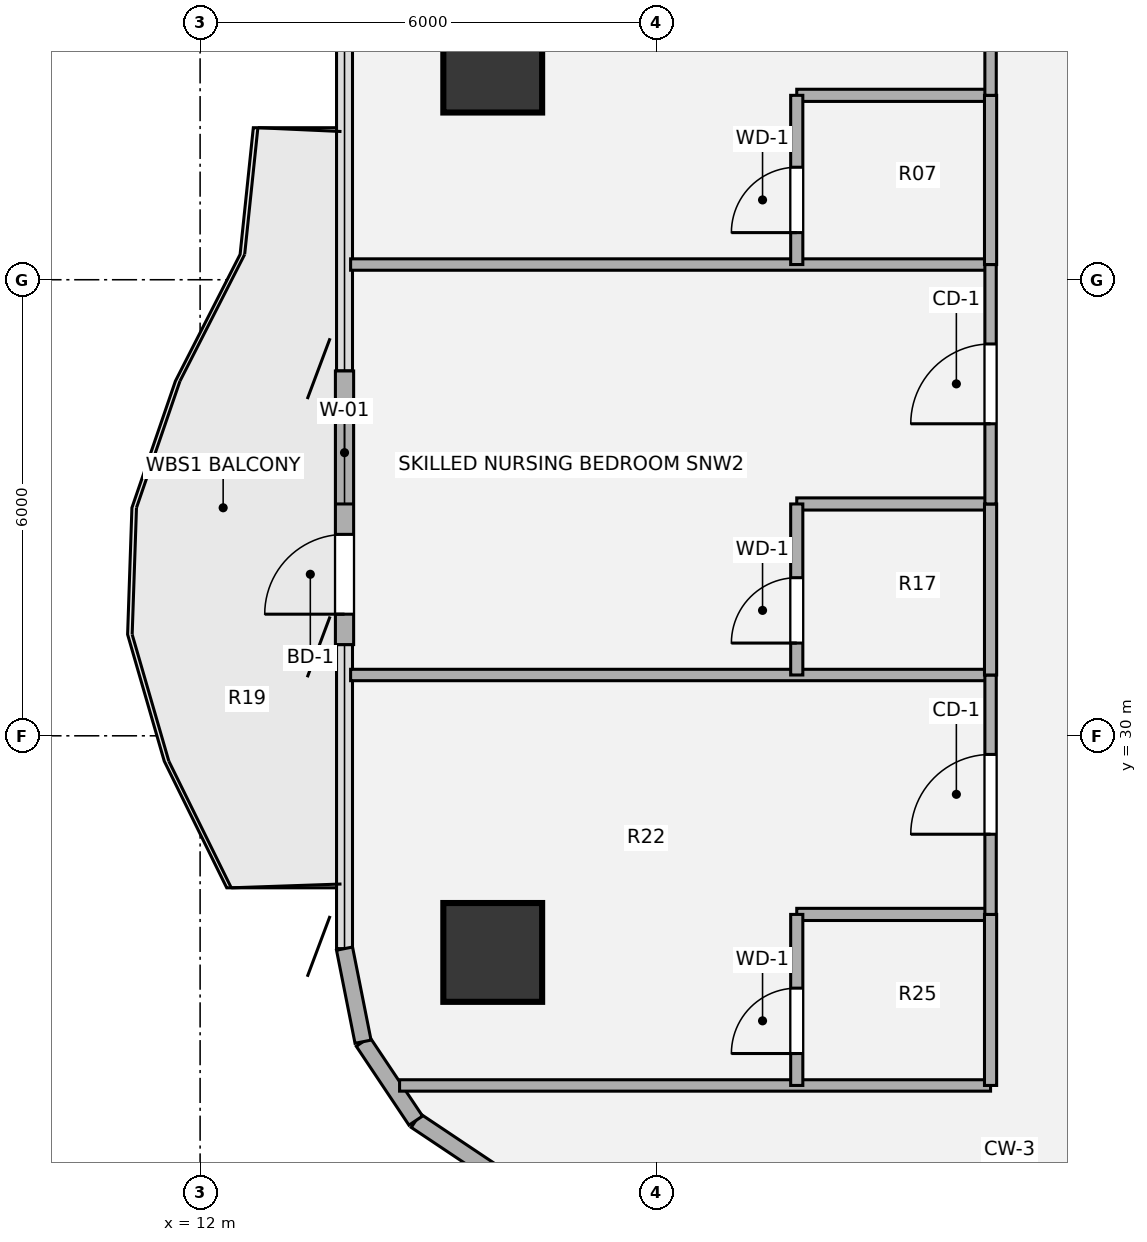
"""IFC4 building model, lengths in metres.
Left out: names, types, materials, properties, quantities, classifications, styles, units other than length and angle.
Written with IfcOpenShell. Run it as: python <this file> out.ifc"""

import sys

from ifc_helpers import new_model, si_unit, direction, frame, frame_2d, origin, origin_2d, place, context, subcontext, project, spatial, rectangle, hollow_circle, extrude, source, transform, mapped, element, fill, save


model = new_model("IFC4")
c1 = context("Model", 3, precision=1e-05, world=origin(), true_north=direction((0.0, 1.0)))
c2 = subcontext(c1, "Body", "Model", "MODEL_VIEW")
j1 = project(units=[si_unit("LENGTHUNIT", "METRE"), si_unit("PLANEANGLEUNIT", "RADIAN")], contexts=[c1])
p1 = place(None, origin())
s1 = spatial("IfcSite", under=j1, at=p1, CompositionType="ELEMENT")
p2 = place(p1, origin())
s2 = spatial("IfcBuilding", under=s1, at=p2, CompositionType="ELEMENT")
p3 = place(p2, frame((0.0, 0.0, 131.4)))
s3 = spatial("IfcBuildingStorey", under=s2, at=p3, CompositionType="ELEMENT", Elevation=131.4)
m1 = source(origin(), c2, "Body", "SweptSolid", [
    extrude(hollow_circle(Radius=0.65, WallThickness=0.045, at=origin_2d()), origin(), (0.0, 0.0, 1.0), 3.78),
])
for number, where, z_axis, x_axis in (
    (1, (15.85, 27.15, 0.0), (0.0, 0.0, 1.0), (1.0, 0.0, 0.0)),
    (2, (15.85, 38.85, 0.0), (0.0, 0.0, 1.0), (1.0, 0.0, 0.0)),
):
    element("IfcColumn", number, at=place(p3, frame(where, z_axis=z_axis, x_axis=x_axis)), inside=s3, PredefinedType="COLUMN", context=c2, shape_type="MappedRepresentation", body=[
        mapped(m1, transform((0.0, 0.0, 0.0), x_axis=(1.0, 0.0, 0.0), y_axis=(0.0, 1.0, 0.0), z_axis=(0.0, 0.0, 1.0), scale=1.0)),
    ])
for number, where, z_axis, x_axis in (
    (3, (15.875, 24.244, 0.0), (0.0, 0.0, 1.0), (-0.831, 0.556, 0.0)),
    (4, (14.837, 24.937, 0.0), (0.0, 0.0, 1.0), (-0.556, 0.831, 0.0)),
    (5, (14.144, 25.975, 0.0), (0.0, 0.0, 1.0), (-0.195, 0.981, 0.0)),
):
    element("IfcWall", number, at=place(p3, frame(where, z_axis=z_axis, x_axis=x_axis)), inside=s3, PredefinedType="SOLIDWALL", context=c2, shape_type="SweptSolid", body=[
        extrude(rectangle(XDim=1.249, YDim=0.215, at=frame_2d((0.624, 0.0))), origin(), (0.0, 0.0, 1.0), 3.53),
    ])
p4 = place(p3, frame((13.9, 31.2, 0.0), z_axis=(0.0, 0.0, 1.0), x_axis=(0.0, 1.0, 0.0)))
e6 = element("IfcWall", 6, at=p4, inside=s3, PredefinedType="SOLIDWALL", context=c2, shape_type="SweptSolid", body=[
    extrude(rectangle(XDim=3.6, YDim=0.24, at=frame_2d((1.8, 0.0))), origin(), (0.0, 0.0, 1.0), 3.53),
])
p5 = place(p4, frame((0.4, 0.0, 0.0)))
e7 = element("IfcOpeningElement", 7, at=p5, cuts=e6, PredefinedType="OPENING", context=c2, shape_type="SweptSolid", body=[
    extrude(rectangle(XDim=1.05, YDim=2.15, at=origin_2d()), frame((0.525, 0.13, 1.075), z_axis=(0.0, -1.0, 0.0), x_axis=(1.0, 0.0, 0.0)), (0.0, 0.0, 1.0), 0.26),
])
p6 = place(p4, frame((1.85, 0.0, 0.85)))
e8 = element("IfcOpeningElement", 8, at=p6, cuts=e6, PredefinedType="OPENING", context=c2, shape_type="SweptSolid", body=[
    extrude(rectangle(XDim=1.35, YDim=1.35, at=origin_2d()), frame((0.675, 0.13, 0.675), z_axis=(0.0, -1.0, 0.0), x_axis=(1.0, 0.0, 0.0)), (0.0, 0.0, 1.0), 0.26),
])
p7 = place(p3, frame((14.624, 25.4, 0.0), z_axis=(0.0, 0.0, 1.0), x_axis=(1.0, 0.0, 0.0)))
e9 = element("IfcWall", 9, at=p7, inside=s3, PredefinedType="PARTITIONING", context=c2, shape_type="SweptSolid", body=[
    extrude(rectangle(XDim=7.776, YDim=0.15, at=frame_2d((3.888, 0.0))), origin(), (0.0, 0.0, 1.0), 3.5),
])
p8 = place(p3, frame((19.85, 27.65, 0.0), z_axis=(0.0, 0.0, 1.0), x_axis=(1.0, 0.0, 0.0)))
e10 = element("IfcWall", 10, at=p8, inside=s3, PredefinedType="PLUMBINGWALL", context=c2, shape_type="SweptSolid", body=[
    extrude(rectangle(XDim=2.55, YDim=0.16, at=frame_2d((1.275, 0.0))), origin(), (0.0, 0.0, 1.0), 2.982),
])
p9 = place(p3, frame((13.98, 30.8, 0.0), z_axis=(0.0, 0.0, 1.0), x_axis=(1.0, 0.0, 0.0)))
e11 = element("IfcWall", 11, at=p9, inside=s3, PredefinedType="PARTITIONING", context=c2, shape_type="SweptSolid", body=[
    extrude(rectangle(XDim=8.42, YDim=0.15, at=frame_2d((4.21, 0.0))), origin(), (0.0, 0.0, 1.0), 2.982),
])
p10 = place(p3, frame((19.85, 33.05, 0.0), z_axis=(0.0, 0.0, 1.0), x_axis=(1.0, 0.0, 0.0)))
e12 = element("IfcWall", 12, at=p10, inside=s3, PredefinedType="PLUMBINGWALL", context=c2, shape_type="SweptSolid", body=[
    extrude(rectangle(XDim=2.55, YDim=0.16, at=frame_2d((1.275, 0.0))), origin(), (0.0, 0.0, 1.0), 2.982),
])
p11 = place(p3, frame((13.98, 36.2, 0.0), z_axis=(0.0, 0.0, 1.0), x_axis=(1.0, 0.0, 0.0)))
e13 = element("IfcWall", 13, at=p11, inside=s3, PredefinedType="PARTITIONING", context=c2, shape_type="SweptSolid", body=[
    extrude(rectangle(XDim=8.42, YDim=0.15, at=frame_2d((4.21, 0.0))), origin(), (0.0, 0.0, 1.0), 2.982),
])
p12 = place(p3, frame((19.85, 38.426, 0.0), z_axis=(0.0, 0.0, 1.0), x_axis=(1.0, 0.0, 0.0)))
e14 = element("IfcWall", 14, at=p12, inside=s3, PredefinedType="PLUMBINGWALL", context=c2, shape_type="SweptSolid", body=[
    extrude(rectangle(XDim=2.55, YDim=0.16, at=frame_2d((1.275, 0.0))), origin(), (0.0, 0.0, 1.0), 3.055),
])
p13 = place(p3, frame((19.85, 25.4, 0.0), z_axis=(0.0, 0.0, 1.0), x_axis=(0.0, 1.0, 0.0)))
e15 = element("IfcWall", 15, at=p13, inside=s3, PredefinedType="PLUMBINGWALL", context=c2, shape_type="SweptSolid", body=[
    extrude(rectangle(XDim=2.25, YDim=0.16, at=frame_2d((1.125, 0.0))), origin(), (0.0, 0.0, 1.0), 3.5),
])
p14 = place(p13, frame((0.42, 0.0, 0.0)))
e16 = element("IfcOpeningElement", 16, at=p14, cuts=e15, PredefinedType="OPENING", context=c2, shape_type="SweptSolid", body=[
    extrude(rectangle(XDim=0.86, YDim=2.1, at=origin_2d()), frame((0.43, 0.09, 1.05), z_axis=(0.0, -1.0, 0.0), x_axis=(1.0, 0.0, 0.0)), (0.0, 0.0, 1.0), 0.18),
])
p15 = place(p3, frame((19.85, 30.8, 0.0), z_axis=(0.0, 0.0, 1.0), x_axis=(0.0, 1.0, 0.0)))
e17 = element("IfcWall", 17, at=p15, inside=s3, PredefinedType="PLUMBINGWALL", context=c2, shape_type="SweptSolid", body=[
    extrude(rectangle(XDim=2.25, YDim=0.16, at=frame_2d((1.125, 0.0))), origin(), (0.0, 0.0, 1.0), 3.5),
])
p16 = place(p15, frame((0.42, 0.0, 0.0)))
e18 = element("IfcOpeningElement", 18, at=p16, cuts=e17, PredefinedType="OPENING", context=c2, shape_type="SweptSolid", body=[
    extrude(rectangle(XDim=0.86, YDim=2.1, at=origin_2d()), frame((0.43, 0.09, 1.05), z_axis=(0.0, -1.0, 0.0), x_axis=(1.0, 0.0, 0.0)), (0.0, 0.0, 1.0), 0.18),
])
p17 = place(p3, frame((19.85, 36.2, 0.0), z_axis=(0.0, 0.0, 1.0), x_axis=(0.0, 1.0, 0.0)))
e19 = element("IfcWall", 19, at=p17, inside=s3, PredefinedType="PLUMBINGWALL", context=c2, shape_type="SweptSolid", body=[
    extrude(rectangle(XDim=2.226, YDim=0.16, at=frame_2d((1.113, 0.0))), origin(), (0.0, 0.0, 1.0), 3.5),
])
p18 = place(p17, frame((0.42, 0.0, 0.0)))
e20 = element("IfcOpeningElement", 20, at=p18, cuts=e19, PredefinedType="OPENING", context=c2, shape_type="SweptSolid", body=[
    extrude(rectangle(XDim=0.86, YDim=2.1, at=origin_2d()), frame((0.43, 0.09, 1.05), z_axis=(0.0, -1.0, 0.0), x_axis=(1.0, 0.0, 0.0)), (0.0, 0.0, 1.0), 0.18),
])
p19 = place(p3, frame((22.4, 25.4, 0.0), z_axis=(0.0, 0.0, 1.0), x_axis=(0.0, 1.0, 0.0)))
e21 = element("IfcWall", 21, at=p19, inside=s3, PredefinedType="PLUMBINGWALL", context=c2, shape_type="SweptSolid", body=[
    extrude(rectangle(XDim=2.25, YDim=0.16, at=frame_2d((1.125, 0.0))), origin(), (0.0, 0.0, 1.0), 3.5),
])
p20 = place(p3, frame((22.4, 27.65, 0.0), z_axis=(0.0, 0.0, 1.0), x_axis=(0.0, 1.0, 0.0)))
e22 = element("IfcWall", 22, at=p20, inside=s3, PredefinedType="PARTITIONING", context=c2, shape_type="SweptSolid", body=[
    extrude(rectangle(XDim=3.15, YDim=0.15, at=frame_2d((1.575, 0.0))), origin(), (0.0, 0.0, 1.0), 3.5),
])
p21 = place(p20, frame((1.055, 0.0, 0.0)))
e23 = element("IfcOpeningElement", 23, at=p21, cuts=e22, PredefinedType="OPENING", context=c2, shape_type="SweptSolid", body=[
    extrude(rectangle(XDim=1.05, YDim=2.1, at=origin_2d()), frame((0.525, 0.085, 1.05), z_axis=(0.0, -1.0, 0.0), x_axis=(1.0, 0.0, 0.0)), (0.0, 0.0, 1.0), 0.17),
])
p22 = place(p3, frame((22.4, 30.8, 0.0), z_axis=(0.0, 0.0, 1.0), x_axis=(0.0, 1.0, 0.0)))
e24 = element("IfcWall", 24, at=p22, inside=s3, PredefinedType="PLUMBINGWALL", context=c2, shape_type="SweptSolid", body=[
    extrude(rectangle(XDim=2.25, YDim=0.16, at=frame_2d((1.125, 0.0))), origin(), (0.0, 0.0, 1.0), 3.5),
])
p23 = place(p3, frame((22.4, 33.05, 0.0), z_axis=(0.0, 0.0, 1.0), x_axis=(0.0, 1.0, 0.0)))
e25 = element("IfcWall", 25, at=p23, inside=s3, PredefinedType="PARTITIONING", context=c2, shape_type="SweptSolid", body=[
    extrude(rectangle(XDim=3.15, YDim=0.15, at=frame_2d((1.575, 0.0))), origin(), (0.0, 0.0, 1.0), 3.5),
])
p24 = place(p23, frame((1.055, 0.0, 0.0)))
e26 = element("IfcOpeningElement", 26, at=p24, cuts=e25, PredefinedType="OPENING", context=c2, shape_type="SweptSolid", body=[
    extrude(rectangle(XDim=1.05, YDim=2.1, at=origin_2d()), frame((0.525, 0.085, 1.05), z_axis=(0.0, -1.0, 0.0), x_axis=(1.0, 0.0, 0.0)), (0.0, 0.0, 1.0), 0.17),
])
p25 = place(p3, frame((22.4, 36.2, 0.0), z_axis=(0.0, 0.0, 1.0), x_axis=(0.0, 1.0, 0.0)))
e27 = element("IfcWall", 27, at=p25, inside=s3, PredefinedType="PLUMBINGWALL", context=c2, shape_type="SweptSolid", body=[
    extrude(rectangle(XDim=2.226, YDim=0.16, at=frame_2d((1.113, 0.0))), origin(), (0.0, 0.0, 1.0), 3.5),
])
p26 = place(p3, frame((22.4, 38.426, 0.0), z_axis=(0.0, 0.0, 1.0), x_axis=(0.0, 1.0, 0.0)))
e28 = element("IfcWall", 28, at=p26, inside=s3, PredefinedType="PARTITIONING", context=c2, shape_type="SweptSolid", body=[
    extrude(rectangle(XDim=3.074, YDim=0.15, at=frame_2d((1.537, 0.0))), origin(), (0.0, 0.0, 1.0), 3.5),
])
p27 = place(p26, frame((1.017, 0.0, 0.0)))
e29 = element("IfcOpeningElement", 29, at=p27, cuts=e28, PredefinedType="OPENING", context=c2, shape_type="SweptSolid", body=[
    extrude(rectangle(XDim=1.05, YDim=2.1, at=origin_2d()), frame((0.525, 0.085, 1.05), z_axis=(0.0, -1.0, 0.0), x_axis=(1.0, 0.0, 0.0)), (0.0, 0.0, 1.0), 0.17),
])
m2 = source(origin(), c2, "Body", "SweptSolid", [
    extrude(rectangle(XDim=1.05, YDim=2.15, at=origin_2d()), frame((0.525, 0.025, 1.075), z_axis=(0.0, -1.0, 0.0), x_axis=(1.0, 0.0, 0.0)), (0.0, 0.0, 1.0), 0.05),
])
p28 = place(p5, origin())
e30 = element("IfcDoor", 30, at=p28, inside=s3, OperationType="SINGLE_SWING_LEFT", PredefinedType="DOOR", context=c2, shape_type="MappedRepresentation", body=[
    mapped(m2, transform((0.0, 0.0, 0.0), x_axis=(1.0, 0.0, 0.0), y_axis=(0.0, 1.0, 0.0), z_axis=(0.0, 0.0, 1.0), scale=1.0)),
])
fill(e7, e30)
m3 = source(origin(), c2, "Body", "SweptSolid", [
    extrude(rectangle(XDim=1.35, YDim=1.35, at=origin_2d()), frame((0.675, 0.03, 0.675), z_axis=(0.0, -1.0, 0.0), x_axis=(1.0, 0.0, 0.0)), (0.0, 0.0, 1.0), 0.06),
])
p29 = place(p6, origin())
e31 = element("IfcWindow", 31, at=p29, inside=s3, PartitioningType="SINGLE_PANEL", PredefinedType="WINDOW", context=c2, shape_type="MappedRepresentation", body=[
    mapped(m3, transform((0.0, 0.0, 0.0), x_axis=(1.0, 0.0, 0.0), y_axis=(0.0, 1.0, 0.0), z_axis=(0.0, 0.0, 1.0), scale=1.0)),
])
fill(e8, e31)
m4 = source(origin(), c2, "Body", "SweptSolid", [
    extrude(rectangle(XDim=0.86, YDim=2.1, at=origin_2d()), frame((0.43, 0.025, 1.05), z_axis=(0.0, -1.0, 0.0), x_axis=(1.0, 0.0, 0.0)), (0.0, 0.0, 1.0), 0.05),
])
p30 = place(p14, origin())
e32 = element("IfcDoor", 32, at=p30, inside=s3, OperationType="SINGLE_SWING_LEFT", PredefinedType="DOOR", context=c2, shape_type="MappedRepresentation", body=[
    mapped(m4, transform((0.0, 0.0, 0.0), x_axis=(1.0, 0.0, 0.0), y_axis=(0.0, 1.0, 0.0), z_axis=(0.0, 0.0, 1.0), scale=1.0)),
])
fill(e16, e32)
p31 = place(p16, origin())
e33 = element("IfcDoor", 33, at=p31, inside=s3, OperationType="SINGLE_SWING_LEFT", PredefinedType="DOOR", context=c2, shape_type="MappedRepresentation", body=[
    mapped(m4, transform((0.0, 0.0, 0.0), x_axis=(1.0, 0.0, 0.0), y_axis=(0.0, 1.0, 0.0), z_axis=(0.0, 0.0, 1.0), scale=1.0)),
])
fill(e18, e33)
p32 = place(p18, origin())
e34 = element("IfcDoor", 34, at=p32, inside=s3, OperationType="SINGLE_SWING_LEFT", PredefinedType="DOOR", context=c2, shape_type="MappedRepresentation", body=[
    mapped(m4, transform((0.0, 0.0, 0.0), x_axis=(1.0, 0.0, 0.0), y_axis=(0.0, 1.0, 0.0), z_axis=(0.0, 0.0, 1.0), scale=1.0)),
])
fill(e20, e34)
m5 = source(origin(), c2, "Body", "SweptSolid", [
    extrude(rectangle(XDim=1.05, YDim=2.1, at=origin_2d()), frame((0.525, 0.025, 1.05), z_axis=(0.0, -1.0, 0.0), x_axis=(1.0, 0.0, 0.0)), (0.0, 0.0, 1.0), 0.05),
])
p33 = place(p21, origin())
e35 = element("IfcDoor", 35, at=p33, inside=s3, OperationType="SINGLE_SWING_LEFT", PredefinedType="DOOR", context=c2, shape_type="MappedRepresentation", body=[
    mapped(m5, transform((0.0, 0.0, 0.0), x_axis=(1.0, 0.0, 0.0), y_axis=(0.0, 1.0, 0.0), z_axis=(0.0, 0.0, 1.0), scale=1.0)),
])
fill(e23, e35)
p34 = place(p24, origin())
e36 = element("IfcDoor", 36, at=p34, inside=s3, OperationType="SINGLE_SWING_LEFT", PredefinedType="DOOR", context=c2, shape_type="MappedRepresentation", body=[
    mapped(m5, transform((0.0, 0.0, 0.0), x_axis=(1.0, 0.0, 0.0), y_axis=(0.0, 1.0, 0.0), z_axis=(0.0, 0.0, 1.0), scale=1.0)),
])
fill(e26, e36)
save(model, sys.argv[1])
